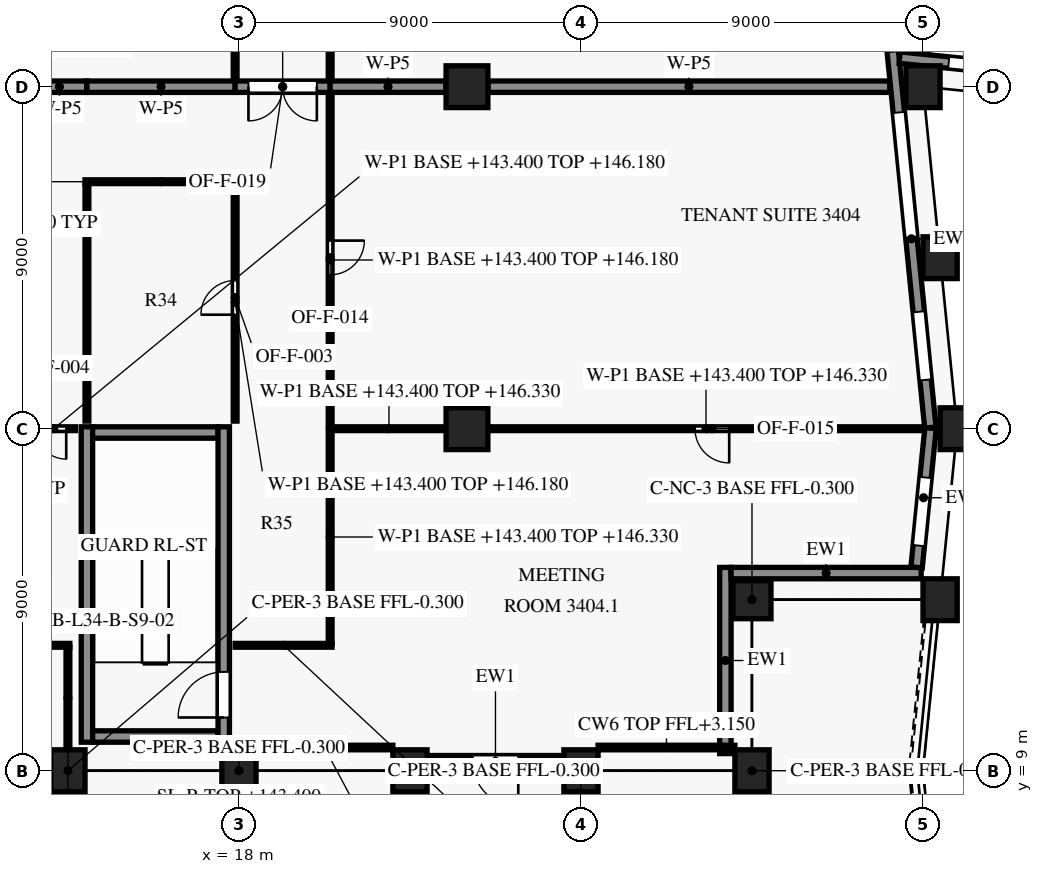
"""IFC4 building model, lengths in metres.
Left out: names, types, materials, properties, quantities, classifications, styles, units other than length and angle.
Written with IfcOpenShell. Run it as: python <this file> out.ifc"""

import sys

from ifc_helpers import new_model, si_unit, direction, frame, frame_2d, origin, origin_2d, place, context, subcontext, project, spatial, rectangle, extrude, element, fill, save


model = new_model("IFC4")
c1 = context("Model", 3, precision=1e-05, world=origin(), true_north=direction((0.0, 1.0)))
c2 = subcontext(c1, "Body", "Model", "MODEL_VIEW")
j1 = project(units=[si_unit("LENGTHUNIT", "METRE"), si_unit("PLANEANGLEUNIT", "RADIAN")], contexts=[c1])
p1 = place(None, origin())
s1 = spatial("IfcSite", under=j1, at=p1, CompositionType="ELEMENT")
p2 = place(p1, origin())
s2 = spatial("IfcBuilding", under=s1, at=p2, CompositionType="ELEMENT")
p3 = place(p2, frame((0.0, 0.0, 143.4)))
s3 = spatial("IfcBuildingStorey", under=s2, at=p3, CompositionType="ELEMENT", Elevation=143.4)
for number, where, z_axis, x_axis in (
    (1, (13.5, 9.0, -0.3), (0.0, 0.0, 1.0), (1.0, 0.0, 0.0)),
    (2, (18.0, 9.0, -0.3), (0.0, 0.0, 1.0), (1.0, 0.0, 0.0)),
    (3, (22.5, 9.0, -0.3), (0.0, 0.0, 1.0), (1.0, 0.0, 0.0)),
    (4, (27.0, 9.0, -0.3), (0.0, 0.0, 1.0), (1.0, 0.0, 0.0)),
    (5, (31.5, 9.0, -0.3), (0.0, 0.0, 1.0), (1.0, 0.0, 0.0)),
):
    element("IfcColumn", number, at=place(p3, frame(where, z_axis=z_axis, x_axis=x_axis)), inside=s3, PredefinedType="COLUMN", context=c2, shape_type="SweptSolid", body=[
        extrude(rectangle(XDim=0.9, YDim=1.1, at=origin_2d()), origin(), (0.0, 0.0, 1.0), 4.1),
    ])
for number, where, z_axis, x_axis in (
    (6, (36.45, 13.5, 0.0), (0.0, 0.0, 1.0), (0.1, 0.995, 0.0)),
    (7, (36.9, 18.0, 0.0), (0.0, 0.0, 1.0), (0.0, 1.0, 0.0)),
    (8, (36.45, 22.5, 0.0), (0.0, 0.0, 1.0), (-0.1, 0.995, 0.0)),
    (9, (36.0, 27.0, 0.0), (0.0, 0.0, 1.0), (-0.1, 0.995, 0.0)),
):
    element("IfcColumn", number, at=place(p3, frame(where, z_axis=z_axis, x_axis=x_axis)), inside=s3, PredefinedType="COLUMN", context=c2, shape_type="SweptSolid", body=[
        extrude(rectangle(XDim=0.9, YDim=1.1, at=origin_2d()), origin(), (0.0, 0.0, 1.0), 3.8),
    ])
p4 = place(p3, frame((31.5, 13.5, -0.3), z_axis=(0.0, 0.0, 1.0), x_axis=(1.0, 0.0, 0.0)))
e10 = element("IfcColumn", 10, at=p4, inside=s3, PredefinedType="COLUMN", context=c2, shape_type="SweptSolid", body=[
    extrude(rectangle(XDim=1.0, YDim=1.0, at=origin_2d()), origin(), (0.0, 0.0, 1.0), 4.1),
])
for number, where, z_axis, x_axis in (
    (11, (24.0, 18.0, 0.0), (0.0, 0.0, 1.0), (1.0, 0.0, 0.0)),
    (12, (24.0, 27.0, 0.0), (0.0, 0.0, 1.0), (1.0, 0.0, 0.0)),
):
    element("IfcColumn", number, at=place(p3, frame(where, z_axis=z_axis, x_axis=x_axis)), inside=s3, PredefinedType="COLUMN", context=c2, shape_type="SweptSolid", body=[
        extrude(rectangle(XDim=1.1, YDim=1.1, at=origin_2d()), origin(), (0.0, 0.0, 1.0), 3.8),
    ])
p5 = place(p3, frame((30.8, 14.35, 0.0), z_axis=(0.0, 0.0, 1.0), x_axis=(0.0, -1.0, 0.0)))
e13 = element("IfcWall", 13, at=p5, inside=s3, PredefinedType="SOLIDWALL", context=c2, shape_type="SweptSolid", body=[
    extrude(rectangle(XDim=4.9, YDim=0.3, at=frame_2d((2.45, 0.0))), origin(), (0.0, 0.0, 1.0), 3.15),
])
p6 = place(p3, frame((35.952, 14.2, 0.0), z_axis=(0.0, 0.0, 1.0), x_axis=(-1.0, 0.0, 0.0)))
e14 = element("IfcWall", 14, at=p6, inside=s3, PredefinedType="SOLIDWALL", context=c2, shape_type="SweptSolid", body=[
    extrude(rectangle(XDim=5.002, YDim=0.3, at=frame_2d((2.501, 0.0))), origin(), (0.0, 0.0, 1.0), 3.15),
])
p7 = place(p3, frame((36.198, 18.015, 0.0), z_axis=(0.0, 0.0, 1.0), x_axis=(-0.099529980022, -0.99503456376, 0.0)))
e15 = element("IfcWall", 15, at=p7, inside=s3, PredefinedType="SOLIDWALL", context=c2, shape_type="SweptSolid", body=[
    extrude(rectangle(XDim=3.682, YDim=0.3, at=frame_2d((1.841, 0.0))), origin(), (0.0, 0.0, 1.0), 3.15),
])
p8 = place(p7, frame((1.306, 0.0, 0.75)))
e16 = element("IfcOpeningElement", 16, at=p8, cuts=e15, PredefinedType="OPENING", context=c2, shape_type="SweptSolid", body=[
    extrude(rectangle(XDim=1.8, YDim=1.8, at=frame_2d((0.9, 0.9))), frame((0.0, 0.16, 0.0), z_axis=(0.0, -1.0, 0.0), x_axis=(1.0, 0.0, 0.0)), (0.0, 0.0, 1.0), 0.32),
])
p9 = place(p3, frame((35.2, 27.964, 0.0), z_axis=(0.0, 0.0, 1.0), x_axis=(0.099501297882, -0.995037432321, 0.0)))
e17 = element("IfcWall", 17, at=p9, inside=s3, PredefinedType="SOLIDWALL", context=c2, shape_type="SweptSolid", body=[
    extrude(rectangle(XDim=9.984, YDim=0.3, at=frame_2d((4.992, 0.0))), origin(), (0.0, 0.0, 1.0), 3.15),
])
p10 = place(p9, frame((1.65, 0.0, 0.15)))
e18 = element("IfcOpeningElement", 18, at=p10, cuts=e17, PredefinedType="OPENING", context=c2, shape_type="SweptSolid", body=[
    extrude(rectangle(XDim=3.3, YDim=2.4, at=frame_2d((1.65, 1.2))), frame((0.0, 0.16, 0.0), z_axis=(0.0, -1.0, 0.0), x_axis=(1.0, 0.0, 0.0)), (0.0, 0.0, 1.0), 0.32),
])
p11 = place(p9, frame((6.923, 0.0, 0.75)))
e19 = element("IfcOpeningElement", 19, at=p11, cuts=e17, PredefinedType="OPENING", context=c2, shape_type="SweptSolid", body=[
    extrude(rectangle(XDim=1.8, YDim=1.8, at=frame_2d((0.9, 0.9))), frame((0.0, 0.16, 0.0), z_axis=(0.0, -1.0, 0.0), x_axis=(1.0, 0.0, 0.0)), (0.0, 0.0, 1.0), 0.32),
])
p12 = place(p3, frame((45.015, 26.802, 0.0), z_axis=(0.0, 0.0, 1.0), x_axis=(-0.995037689759, 0.099498723402, 0.0)))
e20 = element("IfcWall", 20, at=p12, inside=s3, PredefinedType="SOLIDWALL", context=c2, shape_type="SweptSolid", body=[
    extrude(rectangle(XDim=9.677, YDim=0.3, at=frame_2d((4.839, 0.0))), origin(), (0.0, 0.0, 1.0), 3.15),
])
p13 = place(p12, frame((1.306, 0.0, 0.75)))
e21 = element("IfcOpeningElement", 21, at=p13, cuts=e20, PredefinedType="OPENING", context=c2, shape_type="SweptSolid", body=[
    extrude(rectangle(XDim=1.8, YDim=1.8, at=frame_2d((0.9, 0.9))), frame((0.0, 0.16, 0.0), z_axis=(0.0, -1.0, 0.0), x_axis=(1.0, 0.0, 0.0)), (0.0, 0.0, 1.0), 0.32),
])
p14 = place(p12, frame((5.079, 0.0, 0.15)))
e22 = element("IfcOpeningElement", 22, at=p14, cuts=e20, PredefinedType="OPENING", context=c2, shape_type="SweptSolid", body=[
    extrude(rectangle(XDim=3.3, YDim=2.4, at=frame_2d((1.65, 1.2))), frame((0.0, 0.16, 0.0), z_axis=(0.0, -1.0, 0.0), x_axis=(1.0, 0.0, 0.0)), (0.0, 0.0, 1.0), 0.32),
])
p15 = place(p3, frame((26.55, 9.25, 0.0), z_axis=(0.0, 0.0, 1.0), x_axis=(-1.0, 0.0, 0.0)))
e23 = element("IfcWall", 23, at=p15, inside=s3, PredefinedType="SOLIDWALL", context=c2, shape_type="SweptSolid", body=[
    extrude(rectangle(XDim=3.6, YDim=0.3, at=frame_2d((1.8, 0.0))), origin(), (0.0, 0.0, 1.0), 3.15),
])
p16 = place(p15, frame((1.2, 0.0, 0.0)))
e24 = element("IfcOpeningElement", 24, at=p16, cuts=e23, PredefinedType="OPENING", context=c2, shape_type="SweptSolid", body=[
    extrude(rectangle(XDim=1.2, YDim=2.5, at=frame_2d((0.6, 1.25))), frame((0.0, 0.16, 0.0), z_axis=(0.0, -1.0, 0.0), x_axis=(1.0, 0.0, 0.0)), (0.0, 0.0, 1.0), 0.32),
])
for number, where, z_axis, x_axis in (
    (25, (14.15, 9.9, 0.0), (0.0, 0.0, 1.0), (1.0, 0.0, 0.0)),
    (26, (14.15, 17.9, 0.0), (0.0, 0.0, 1.0), (1.0, 0.0, 0.0)),
):
    element("IfcWall", number, at=place(p3, frame(where, z_axis=z_axis, x_axis=x_axis)), inside=s3, PredefinedType="SHEAR", context=c2, shape_type="SweptSolid", body=[
        extrude(rectangle(XDim=3.3, YDim=0.3, at=frame_2d((1.65, 0.0))), origin(), (0.0, 0.0, 1.0), 3.5),
    ])
p17 = place(p3, frame((14.0, 9.75, 0.0), z_axis=(0.0, 0.0, 1.0), x_axis=(0.0, 1.0, 0.0)))
e27 = element("IfcWall", 27, at=p17, inside=s3, PredefinedType="SHEAR", context=c2, shape_type="SweptSolid", body=[
    extrude(rectangle(XDim=8.3, YDim=0.3, at=frame_2d((4.15, 0.0))), origin(), (0.0, 0.0, 1.0), 3.5),
])
p18 = place(p3, frame((17.6, 9.55, 0.0), z_axis=(0.0, 0.0, 1.0), x_axis=(0.0, 1.0, 0.0)))
e28 = element("IfcWall", 28, at=p18, inside=s3, PredefinedType="SHEAR", context=c2, shape_type="SweptSolid", body=[
    extrude(rectangle(XDim=8.5, YDim=0.3, at=frame_2d((4.25, 0.0))), origin(), (0.0, 0.0, 1.0), 3.5),
])
p19 = place(p18, frame((0.85, 0.0, 0.0)))
e29 = element("IfcOpeningElement", 29, at=p19, cuts=e28, PredefinedType="OPENING", context=c2, shape_type="SweptSolid", body=[
    extrude(rectangle(XDim=1.2, YDim=2.2, at=frame_2d((0.6, 1.1))), frame((0.0, 0.16, 0.0), z_axis=(0.0, -1.0, 0.0), x_axis=(1.0, 0.0, 0.0)), (0.0, 0.0, 1.0), 0.32),
])
p20 = place(p3, frame((13.5, 12.25, 0.0), z_axis=(0.0, 0.0, 1.0), x_axis=(0.0, -1.0, 0.0)))
e30 = element("IfcWall", 30, at=p20, inside=s3, PredefinedType="PARTITIONING", context=c2, shape_type="SweptSolid", body=[
    extrude(rectangle(XDim=2.68, YDim=0.1, at=frame_2d((1.34, 0.0))), origin(), (0.0, 0.0, 1.0), 2.78),
])
p21 = place(p3, frame((11.5, 12.3, 0.0), z_axis=(0.0, 0.0, 1.0), x_axis=(1.0, 0.0, 0.0)))
e31 = element("IfcWall", 31, at=p21, inside=s3, PredefinedType="PARTITIONING", context=c2, shape_type="SweptSolid", body=[
    extrude(rectangle(XDim=2.05, YDim=0.1, at=frame_2d((1.025, 0.0))), origin(), (0.0, 0.0, 1.0), 2.78),
])
p22 = place(p3, frame((20.45, 12.3, 0.0), z_axis=(0.0, 0.0, 1.0), x_axis=(-1.0, 0.0, 0.0)))
e32 = element("IfcWall", 32, at=p22, inside=s3, PredefinedType="PARTITIONING", context=c2, shape_type="SweptSolid", body=[
    extrude(rectangle(XDim=2.55, YDim=0.1, at=frame_2d((1.275, 0.0))), origin(), (0.0, 0.0, 1.0), 2.78),
])
p23 = place(p3, frame((20.4, 17.95, 0.0), z_axis=(0.0, 0.0, 1.0), x_axis=(0.0, -1.0, 0.0)))
e33 = element("IfcWall", 33, at=p23, inside=s3, PredefinedType="PARTITIONING", context=c2, shape_type="SweptSolid", body=[
    extrude(rectangle(XDim=5.6, YDim=0.1, at=frame_2d((2.8, 0.0))), origin(), (0.0, 0.0, 1.0), 2.93),
])
p24 = place(p3, frame((13.7, 18.0, 0.0), z_axis=(0.0, 0.0, 1.0), x_axis=(-1.0, 0.0, 0.0)))
e34 = element("IfcWall", 34, at=p24, inside=s3, PredefinedType="PARTITIONING", context=c2, shape_type="SweptSolid", body=[
    extrude(rectangle(XDim=1.145, YDim=0.1, at=frame_2d((0.573, 0.0))), origin(), (0.0, 0.0, 1.0), 2.78),
])
p25 = place(p24, frame((0.245, 0.0, 0.0)))
e35 = element("IfcOpeningElement", 35, at=p25, cuts=e34, PredefinedType="OPENING", context=c2, shape_type="SweptSolid", body=[
    extrude(rectangle(XDim=0.8, YDim=2.1, at=frame_2d((0.4, 1.05))), frame((0.0, 0.06, 0.0), z_axis=(0.0, -1.0, 0.0), x_axis=(1.0, 0.0, 0.0)), (0.0, 0.0, 1.0), 0.12),
])
p26 = place(p3, frame((23.445, 18.0, 0.0), z_axis=(0.0, 0.0, 1.0), x_axis=(-1.0, 0.0, 0.0)))
e36 = element("IfcWall", 36, at=p26, inside=s3, PredefinedType="PARTITIONING", context=c2, shape_type="SweptSolid", body=[
    extrude(rectangle(XDim=2.995, YDim=0.1, at=frame_2d((1.498, 0.0))), origin(), (0.0, 0.0, 1.0), 2.93),
])
p27 = place(p3, frame((36.026, 18.0, 0.0), z_axis=(0.0, 0.0, 1.0), x_axis=(-1.0, 0.0, 0.0)))
e37 = element("IfcWall", 37, at=p27, inside=s3, PredefinedType="PARTITIONING", context=c2, shape_type="SweptSolid", body=[
    extrude(rectangle(XDim=11.471, YDim=0.1, at=frame_2d((5.735, 0.0))), origin(), (0.0, 0.0, 1.0), 2.93),
])
p28 = place(p27, frame((5.126, 0.0, 0.0)))
e38 = element("IfcOpeningElement", 38, at=p28, cuts=e37, PredefinedType="OPENING", context=c2, shape_type="SweptSolid", body=[
    extrude(rectangle(XDim=0.9, YDim=2.1, at=frame_2d((0.45, 1.05))), frame((0.0, 0.06, 0.0), z_axis=(0.0, -1.0, 0.0), x_axis=(1.0, 0.0, 0.0)), (0.0, 0.0, 1.0), 0.12),
])
p29 = place(p3, frame((17.9, 18.2, 0.0), z_axis=(0.0, 0.0, 1.0), x_axis=(0.0, 1.0, 0.0)))
e39 = element("IfcWall", 39, at=p29, inside=s3, PredefinedType="PARTITIONING", context=c2, shape_type="SweptSolid", body=[
    extrude(rectangle(XDim=6.25, YDim=0.1, at=frame_2d((3.125, 0.0))), origin(), (0.0, 0.0, 1.0), 2.78),
])
p30 = place(p29, frame((2.8, 0.0, 0.0)))
e40 = element("IfcOpeningElement", 40, at=p30, cuts=e39, PredefinedType="OPENING", context=c2, shape_type="SweptSolid", body=[
    extrude(rectangle(XDim=0.9, YDim=2.1, at=frame_2d((0.45, 1.05))), frame((0.0, 0.06, 0.0), z_axis=(0.0, -1.0, 0.0), x_axis=(1.0, 0.0, 0.0)), (0.0, 0.0, 1.0), 0.12),
])
p31 = place(p3, frame((14.0, 24.45, 0.0), z_axis=(0.0, 0.0, 1.0), x_axis=(0.0, -1.0, 0.0)))
e41 = element("IfcWall", 41, at=p31, inside=s3, PredefinedType="PARTITIONING", context=c2, shape_type="SweptSolid", body=[
    extrude(rectangle(XDim=6.25, YDim=0.1, at=frame_2d((3.125, 0.0))), origin(), (0.0, 0.0, 1.0), 3.48),
])
p32 = place(p3, frame((17.95, 24.5, 0.0), z_axis=(0.0, 0.0, 1.0), x_axis=(-1.0, 0.0, 0.0)))
e42 = element("IfcWall", 42, at=p32, inside=s3, PredefinedType="PARTITIONING", context=c2, shape_type="SweptSolid", body=[
    extrude(rectangle(XDim=4.0, YDim=0.1, at=frame_2d((2.0, 0.0))), origin(), (0.0, 0.0, 1.0), 2.78),
])
p33 = place(p3, frame((20.4, 26.83, 0.0), z_axis=(0.0, 0.0, 1.0), x_axis=(0.0, -1.0, 0.0)))
e43 = element("IfcWall", 43, at=p33, inside=s3, PredefinedType="PARTITIONING", context=c2, shape_type="SweptSolid", body=[
    extrude(rectangle(XDim=8.78, YDim=0.1, at=frame_2d((4.39, 0.0))), origin(), (0.0, 0.0, 1.0), 2.78),
])
p34 = place(p33, frame((3.88, 0.0, 0.0)))
e44 = element("IfcOpeningElement", 44, at=p34, cuts=e43, PredefinedType="OPENING", context=c2, shape_type="SweptSolid", body=[
    extrude(rectangle(XDim=0.9, YDim=2.1, at=frame_2d((0.45, 1.05))), frame((0.0, 0.06, 0.0), z_axis=(0.0, -1.0, 0.0), x_axis=(1.0, 0.0, 0.0)), (0.0, 0.0, 1.0), 0.12),
])
p35 = place(p3, frame((12.555, 27.0, 0.0), z_axis=(0.0, 0.0, 1.0), x_axis=(1.0, 0.0, 0.0)))
e45 = element("IfcWall", 45, at=p35, inside=s3, PredefinedType="PARTITIONING", context=c2, shape_type="SweptSolid", body=[
    extrude(rectangle(XDim=1.445, YDim=0.3, at=frame_2d((0.723, 0.0))), origin(), (0.0, 0.0, 1.0), 2.78),
])
p36 = place(p3, frame((14.0, 27.0, 0.0), z_axis=(0.0, 0.0, 1.0), x_axis=(1.0, 0.0, 0.0)))
e46 = element("IfcWall", 46, at=p36, inside=s3, PredefinedType="PARTITIONING", context=c2, shape_type="SweptSolid", body=[
    extrude(rectangle(XDim=3.9, YDim=0.3, at=frame_2d((1.95, 0.0))), origin(), (0.0, 0.0, 1.0), 2.78),
])
p37 = place(p3, frame((20.4, 27.0, 0.0), z_axis=(0.0, 0.0, 1.0), x_axis=(-1.0, 0.0, 0.0)))
e47 = element("IfcWall", 47, at=p37, inside=s3, PredefinedType="PARTITIONING", context=c2, shape_type="SweptSolid", body=[
    extrude(rectangle(XDim=2.5, YDim=0.3, at=frame_2d((1.25, 0.0))), origin(), (0.0, 0.0, 1.0), 2.78),
])
p38 = place(p37, frame((0.35, 0.0, 0.0)))
e48 = element("IfcOpeningElement", 48, at=p38, cuts=e47, PredefinedType="OPENING", context=c2, shape_type="SweptSolid", body=[
    extrude(rectangle(XDim=1.8, YDim=2.1, at=frame_2d((0.9, 1.05))), frame((0.0, 0.16, 0.0), z_axis=(0.0, -1.0, 0.0), x_axis=(1.0, 0.0, 0.0)), (0.0, 0.0, 1.0), 0.32),
])
p39 = place(p3, frame((20.4, 27.0, 0.0), z_axis=(0.0, 0.0, 1.0), x_axis=(1.0, 0.0, 0.0)))
e49 = element("IfcWall", 49, at=p39, inside=s3, PredefinedType="PARTITIONING", context=c2, shape_type="SweptSolid", body=[
    extrude(rectangle(XDim=3.045, YDim=0.3, at=frame_2d((1.522, 0.0))), origin(), (0.0, 0.0, 1.0), 2.78),
])
p40 = place(p3, frame((24.555, 27.0, 0.0), z_axis=(0.0, 0.0, 1.0), x_axis=(1.0, 0.0, 0.0)))
e50 = element("IfcWall", 50, at=p40, inside=s3, PredefinedType="PARTITIONING", context=c2, shape_type="SweptSolid", body=[
    extrude(rectangle(XDim=10.571, YDim=0.3, at=frame_2d((5.285, 0.0))), origin(), (0.0, 0.0, 1.0), 2.78),
])
p41 = place(p3, frame((17.9, 27.17, 0.0), z_axis=(0.0, 0.0, 1.0), x_axis=(0.0, 1.0, 0.0)))
e51 = element("IfcWall", 51, at=p41, inside=s3, PredefinedType="PARTITIONING", context=c2, shape_type="SweptSolid", body=[
    extrude(rectangle(XDim=6.28, YDim=0.1, at=frame_2d((3.14, 0.0))), origin(), (0.0, 0.0, 1.0), 2.78),
])
p42 = place(p3, frame((36.0, 27.874, 0.0), z_axis=(0.0, 0.0, 1.0), x_axis=(0.0, 1.0, 0.0)))
e52 = element("IfcWall", 52, at=p42, inside=s3, PredefinedType="PARTITIONING", context=c2, shape_type="SweptSolid", body=[
    extrude(rectangle(XDim=5.263, YDim=0.3, at=frame_2d((2.632, 0.0))), origin(), (0.0, 0.0, 1.0), 2.78),
])
p43 = place(p3, frame((20.4, 33.45, 0.0), z_axis=(0.0, 0.0, 1.0), x_axis=(0.0, -1.0, 0.0)))
e53 = element("IfcWall", 53, at=p43, inside=s3, PredefinedType="PARTITIONING", context=c2, shape_type="SweptSolid", body=[
    extrude(rectangle(XDim=6.28, YDim=0.1, at=frame_2d((3.14, 0.0))), origin(), (0.0, 0.0, 1.0), 2.78),
])
p44 = place(p8, origin())
e54 = element("IfcWindow", 54, at=p44, inside=s3, PartitioningType="SINGLE_PANEL", PredefinedType="WINDOW", context=c2, shape_type="SweptSolid", body=[
    extrude(rectangle(XDim=1.8, YDim=1.8, at=frame_2d((0.9, 0.9))), frame((0.0, 0.03, 0.0), z_axis=(0.0, -1.0, 0.0), x_axis=(1.0, 0.0, 0.0)), (0.0, 0.0, 1.0), 0.06),
])
fill(e16, e54)
p45 = place(p10, origin())
e55 = element("IfcWindow", 55, at=p45, inside=s3, PartitioningType="SINGLE_PANEL", PredefinedType="WINDOW", context=c2, shape_type="SweptSolid", body=[
    extrude(rectangle(XDim=3.3, YDim=2.4, at=frame_2d((1.65, 1.2))), frame((0.0, 0.03, 0.0), z_axis=(0.0, -1.0, 0.0), x_axis=(1.0, 0.0, 0.0)), (0.0, 0.0, 1.0), 0.06),
])
fill(e18, e55)
p46 = place(p11, origin())
e56 = element("IfcWindow", 56, at=p46, inside=s3, PartitioningType="SINGLE_PANEL", PredefinedType="WINDOW", context=c2, shape_type="SweptSolid", body=[
    extrude(rectangle(XDim=1.8, YDim=1.8, at=frame_2d((0.9, 0.9))), frame((0.0, 0.03, 0.0), z_axis=(0.0, -1.0, 0.0), x_axis=(1.0, 0.0, 0.0)), (0.0, 0.0, 1.0), 0.06),
])
fill(e19, e56)
p47 = place(p14, origin())
e57 = element("IfcWindow", 57, at=p47, inside=s3, PartitioningType="SINGLE_PANEL", PredefinedType="WINDOW", context=c2, shape_type="SweptSolid", body=[
    extrude(rectangle(XDim=3.3, YDim=2.4, at=frame_2d((1.65, 1.2))), frame((0.0, 0.03, 0.0), z_axis=(0.0, -1.0, 0.0), x_axis=(1.0, 0.0, 0.0)), (0.0, 0.0, 1.0), 0.06),
])
fill(e22, e57)
p48 = place(p16, origin())
e58 = element("IfcDoor", 58, at=p48, inside=s3, OperationType="SINGLE_SWING_LEFT", PredefinedType="DOOR", context=c2, shape_type="SweptSolid", body=[
    extrude(rectangle(XDim=1.2, YDim=2.5, at=frame_2d((0.6, 1.25))), frame((0.0, 0.025, 0.0), z_axis=(0.0, -1.0, 0.0), x_axis=(1.0, 0.0, 0.0)), (0.0, 0.0, 1.0), 0.05),
])
fill(e24, e58)
p49 = place(p19, origin())
e59 = element("IfcDoor", 59, at=p49, inside=s3, OperationType="SINGLE_SWING_LEFT", PredefinedType="DOOR", context=c2, shape_type="SweptSolid", body=[
    extrude(rectangle(XDim=1.2, YDim=2.2, at=frame_2d((0.6, 1.1))), frame((0.0, 0.025, 0.0), z_axis=(0.0, -1.0, 0.0), x_axis=(1.0, 0.0, 0.0)), (0.0, 0.0, 1.0), 0.05),
])
fill(e29, e59)
p50 = place(p30, origin())
e60 = element("IfcDoor", 60, at=p50, inside=s3, OperationType="SINGLE_SWING_LEFT", PredefinedType="DOOR", context=c2, shape_type="SweptSolid", body=[
    extrude(rectangle(XDim=0.9, YDim=2.1, at=frame_2d((0.45, 1.05))), frame((0.0, 0.025, 0.0), z_axis=(0.0, -1.0, 0.0), x_axis=(1.0, 0.0, 0.0)), (0.0, 0.0, 1.0), 0.05),
])
fill(e40, e60)
p51 = place(p25, origin())
e61 = element("IfcDoor", 61, at=p51, inside=s3, OperationType="SINGLE_SWING_LEFT", PredefinedType="DOOR", context=c2, shape_type="SweptSolid", body=[
    extrude(rectangle(XDim=0.8, YDim=2.1, at=frame_2d((0.4, 1.05))), frame((0.0, 0.025, 0.0), z_axis=(0.0, -1.0, 0.0), x_axis=(1.0, 0.0, 0.0)), (0.0, 0.0, 1.0), 0.05),
])
fill(e35, e61)
p52 = place(p34, origin())
e62 = element("IfcDoor", 62, at=p52, inside=s3, OperationType="SINGLE_SWING_LEFT", PredefinedType="DOOR", context=c2, shape_type="SweptSolid", body=[
    extrude(rectangle(XDim=0.9, YDim=2.1, at=frame_2d((0.45, 1.05))), frame((0.0, 0.025, 0.0), z_axis=(0.0, -1.0, 0.0), x_axis=(1.0, 0.0, 0.0)), (0.0, 0.0, 1.0), 0.05),
])
fill(e44, e62)
p53 = place(p28, origin())
e63 = element("IfcDoor", 63, at=p53, inside=s3, OperationType="SINGLE_SWING_LEFT", PredefinedType="DOOR", context=c2, shape_type="SweptSolid", body=[
    extrude(rectangle(XDim=0.9, YDim=2.1, at=frame_2d((0.45, 1.05))), frame((0.0, 0.025, 0.0), z_axis=(0.0, -1.0, 0.0), x_axis=(1.0, 0.0, 0.0)), (0.0, 0.0, 1.0), 0.05),
])
fill(e38, e63)
p54 = place(p38, origin())
e64 = element("IfcDoor", 64, at=p54, inside=s3, OperationType="DOUBLE_DOOR_SINGLE_SWING", PredefinedType="DOOR", context=c2, shape_type="SweptSolid", body=[
    extrude(rectangle(XDim=1.8, YDim=2.1, at=frame_2d((0.9, 1.05))), frame((0.0, 0.025, 0.0), z_axis=(0.0, -1.0, 0.0), x_axis=(1.0, 0.0, 0.0)), (0.0, 0.0, 1.0), 0.05),
])
fill(e48, e64)
save(model, sys.argv[1])
